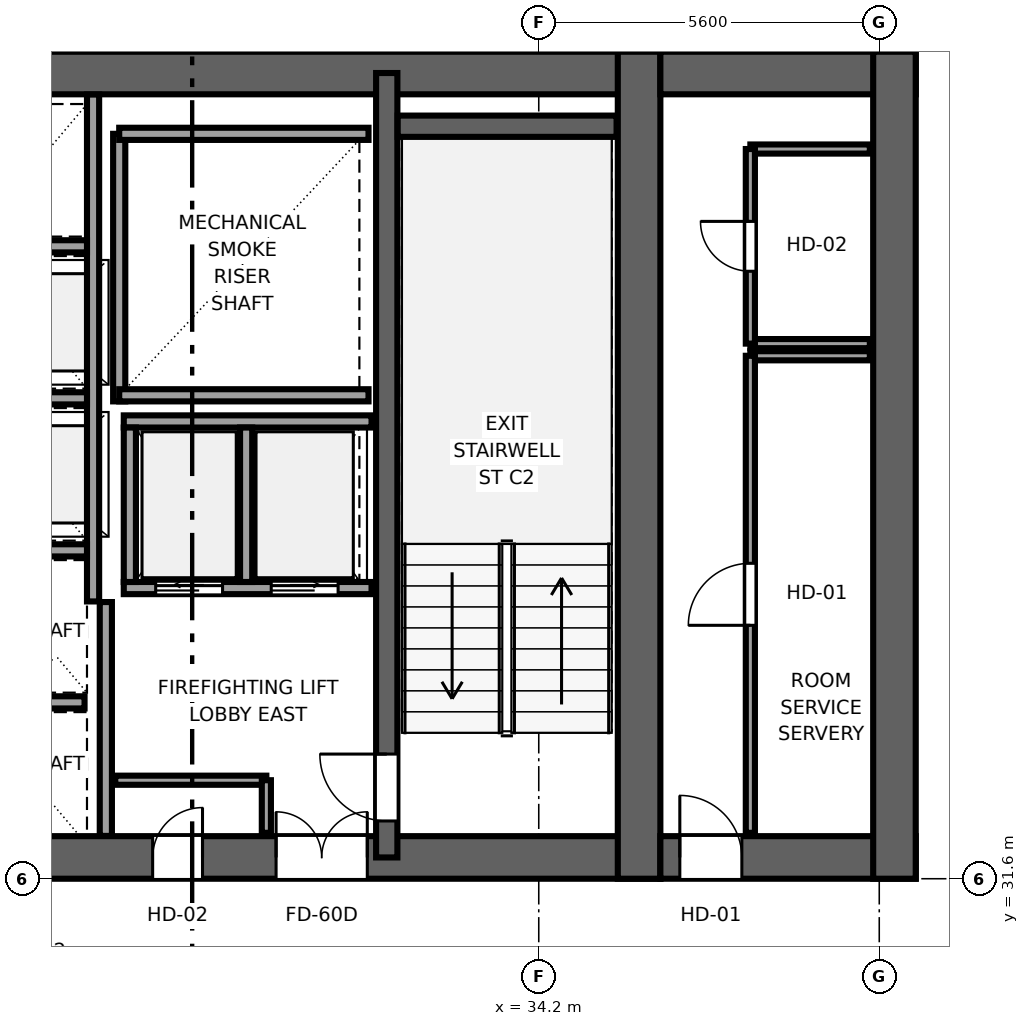
"""IFC4 building model, lengths in metres.
Left out: names, types, materials, properties, quantities, classifications, styles, units other than length and angle.
Written with IfcOpenShell. Run it as: python <this file> out.ifc"""

import sys

from ifc_helpers import new_model, si_unit, direction, frame, frame_2d, origin, place, context, subcontext, project, spatial, rectangle, extrude, source, transform, mapped, element, fill, save


model = new_model("IFC4")
c1 = context("Model", 3, precision=1e-05, world=origin(), true_north=direction((0.0, 1.0)))
c2 = subcontext(c1, "Body", "Model", "MODEL_VIEW")
j1 = project(units=[si_unit("LENGTHUNIT", "METRE"), si_unit("PLANEANGLEUNIT", "RADIAN")], contexts=[c1])
p1 = place(None, origin())
s1 = spatial("IfcSite", under=j1, at=p1, CompositionType="ELEMENT")
p2 = place(p1, origin())
s2 = spatial("IfcBuilding", under=s1, at=p2, CompositionType="ELEMENT")
p3 = place(p2, frame((0.0, 0.0, 115.1)))
s3 = spatial("IfcBuildingStorey", under=s2, at=p3, CompositionType="ELEMENT", Elevation=115.1)
p4 = place(p3, frame((9.8, 31.95, 0.0), z_axis=(0.0, 0.0, 1.0), x_axis=(1.0, 0.0, 0.0)))
e1 = element("IfcWall", 1, at=p4, inside=s3, PredefinedType="SHEAR", context=c2, shape_type="SweptSolid", body=[
    extrude(rectangle(XDim=26.4, YDim=0.7, at=frame_2d((13.2, 0.0))), origin(), (0.0, 0.0, 1.0), 3.55),
])
p5 = place(p4, frame((6.32, 0.0, 0.0), z_axis=(0.0, 0.0, 1.0), x_axis=(-1.0, 0.0, 0.0)))
e2 = element("IfcOpeningElement", 2, at=p5, cuts=e1, PredefinedType="OPENING", context=c2, shape_type="SweptSolid", body=[
    extrude(rectangle(XDim=1.5, YDim=2.04, at=frame_2d((0.75, 1.02))), frame((0.0, 0.36, 0.0), z_axis=(0.0, -1.0, 0.0), x_axis=(1.0, 0.0, 0.0)), (0.0, 0.0, 1.0), 0.72),
])
p6 = place(p4, frame((13.95, 0.0, 0.0), z_axis=(0.0, 0.0, 1.0), x_axis=(-1.0, 0.0, 0.0)))
e3 = element("IfcOpeningElement", 3, at=p6, cuts=e1, PredefinedType="OPENING", context=c2, shape_type="SweptSolid", body=[
    extrude(rectangle(XDim=1.5, YDim=2.04, at=frame_2d((0.75, 1.02))), frame((0.0, 0.36, 0.0), z_axis=(0.0, -1.0, 0.0), x_axis=(1.0, 0.0, 0.0)), (0.0, 0.0, 1.0), 0.72),
])
p7 = place(p4, frame((21.58, 0.0, 0.0), z_axis=(0.0, 0.0, 1.0), x_axis=(-1.0, 0.0, 0.0)))
e4 = element("IfcOpeningElement", 4, at=p7, cuts=e1, PredefinedType="OPENING", context=c2, shape_type="SweptSolid", body=[
    extrude(rectangle(XDim=1.5, YDim=2.04, at=frame_2d((0.75, 1.02))), frame((0.0, 0.36, 0.0), z_axis=(0.0, -1.0, 0.0), x_axis=(1.0, 0.0, 0.0)), (0.0, 0.0, 1.0), 0.72),
])
p8 = place(p4, frame((8.37, 0.0, 0.0), z_axis=(0.0, 0.0, 1.0), x_axis=(-1.0, 0.0, 0.0)))
e5 = element("IfcOpeningElement", 5, at=p8, cuts=e1, PredefinedType="OPENING", context=c2, shape_type="SweptSolid", body=[
    extrude(rectangle(XDim=0.82, YDim=2.01, at=frame_2d((0.41, 1.005))), frame((0.0, 0.36, 0.0), z_axis=(0.0, -1.0, 0.0), x_axis=(1.0, 0.0, 0.0)), (0.0, 0.0, 1.0), 0.72),
])
p9 = place(p4, frame((18.87, 0.0, 0.0), z_axis=(0.0, 0.0, 1.0), x_axis=(-1.0, 0.0, 0.0)))
e6 = element("IfcOpeningElement", 6, at=p9, cuts=e1, PredefinedType="OPENING", context=c2, shape_type="SweptSolid", body=[
    extrude(rectangle(XDim=0.82, YDim=2.01, at=frame_2d((0.41, 1.005))), frame((0.0, 0.36, 0.0), z_axis=(0.0, -1.0, 0.0), x_axis=(1.0, 0.0, 0.0)), (0.0, 0.0, 1.0), 0.72),
])
p10 = place(p3, frame((9.8, 44.85, 0.0), z_axis=(0.0, 0.0, 1.0), x_axis=(1.0, 0.0, 0.0)))
e7 = element("IfcWall", 7, at=p10, inside=s3, PredefinedType="SHEAR", context=c2, shape_type="SweptSolid", body=[
    extrude(rectangle(XDim=26.4, YDim=0.7, at=frame_2d((13.2, 0.0))), origin(), (0.0, 0.0, 1.0), 3.55),
])
p11 = place(p3, frame((35.85, 31.6, 0.0), z_axis=(0.0, 0.0, 1.0), x_axis=(0.0, 1.0, 0.0)))
e8 = element("IfcWall", 8, at=p11, inside=s3, PredefinedType="SHEAR", context=c2, shape_type="SweptSolid", body=[
    extrude(rectangle(XDim=13.6, YDim=0.7, at=frame_2d((6.8, 0.0))), origin(), (0.0, 0.0, 1.0), 3.55),
])
p12 = place(p3, frame((31.7, 31.95, 0.0), z_axis=(0.0, 0.0, 1.0), x_axis=(0.0, 1.0, 0.0)))
e9 = element("IfcWall", 9, at=p12, inside=s3, PredefinedType="SHEAR", context=c2, shape_type="SweptSolid", body=[
    extrude(rectangle(XDim=12.9, YDim=0.35, at=frame_2d((6.45, 0.0))), origin(), (0.0, 0.0, 1.0), 3.55),
])
p13 = place(p12, frame((1.7, 0.0, 0.0), z_axis=(0.0, 0.0, 1.0), x_axis=(-1.0, 0.0, 0.0)))
e10 = element("IfcOpeningElement", 10, at=p13, cuts=e9, PredefinedType="OPENING", context=c2, shape_type="SweptSolid", body=[
    extrude(rectangle(XDim=1.1, YDim=2.12, at=frame_2d((0.55, 1.06))), frame((0.0, 0.185, 0.0), z_axis=(0.0, -1.0, 0.0), x_axis=(1.0, 0.0, 0.0)), (0.0, 0.0, 1.0), 0.37),
])
p14 = place(p3, frame((36.2, 31.95, 0.0), z_axis=(0.0, 0.0, 1.0), x_axis=(1.0, 0.0, 0.0)))
e11 = element("IfcWall", 11, at=p14, inside=s3, PredefinedType="SHEAR", context=c2, shape_type="SweptSolid", body=[
    extrude(rectangle(XDim=4.2, YDim=0.7, at=frame_2d((2.1, 0.0))), origin(), (0.0, 0.0, 1.0), 3.55),
])
p15 = place(p14, frame((1.34, 0.0, 0.0), z_axis=(0.0, 0.0, 1.0), x_axis=(-1.0, 0.0, 0.0)))
e12 = element("IfcOpeningElement", 12, at=p15, cuts=e11, PredefinedType="OPENING", context=c2, shape_type="SweptSolid", body=[
    extrude(rectangle(XDim=1.02, YDim=2.03, at=frame_2d((0.51, 1.015))), frame((0.0, 0.36, 0.0), z_axis=(0.0, -1.0, 0.0), x_axis=(1.0, 0.0, 0.0)), (0.0, 0.0, 1.0), 0.72),
])
p16 = place(p3, frame((36.2, 44.85, 0.0), z_axis=(0.0, 0.0, 1.0), x_axis=(1.0, 0.0, 0.0)))
e13 = element("IfcWall", 13, at=p16, inside=s3, PredefinedType="SHEAR", context=c2, shape_type="SweptSolid", body=[
    extrude(rectangle(XDim=4.2, YDim=0.7, at=frame_2d((2.1, 0.0))), origin(), (0.0, 0.0, 1.0), 3.55),
])
p17 = place(p3, frame((40.05, 31.6, 0.0), z_axis=(0.0, 0.0, 1.0), x_axis=(0.0, 1.0, 0.0)))
e14 = element("IfcWall", 14, at=p17, inside=s3, PredefinedType="SHEAR", context=c2, shape_type="SweptSolid", body=[
    extrude(rectangle(XDim=13.6, YDim=0.7, at=frame_2d((6.8, 0.0))), origin(), (0.0, 0.0, 1.0), 3.55),
])
p18 = place(p3, frame((31.88, 43.975, 0.0), z_axis=(0.0, 0.0, 1.0), x_axis=(1.0, 0.0, 0.0)))
e15 = element("IfcWall", 15, at=p18, inside=s3, PredefinedType="SHEAR", context=c2, shape_type="SweptSolid", body=[
    extrude(rectangle(XDim=3.6, YDim=0.35, at=frame_2d((1.8, 0.0))), origin(), (0.0, 0.0, 1.0), 3.55),
])
p19 = place(p3, frame((27.3, 39.45, 0.0), z_axis=(0.0, 0.0, 1.0), x_axis=(0.0, 1.0, 0.0)))
e16 = element("IfcWall", 16, at=p19, inside=s3, PredefinedType="SOLIDWALL", context=c2, shape_type="SweptSolid", body=[
    extrude(rectangle(XDim=4.4, YDim=0.2, at=frame_2d((2.2, 0.0))), origin(), (0.0, 0.0, 1.0), 3.37),
])
for number, where, z_axis, x_axis in (
    (17, (27.3, 39.55, 0.0), (0.0, 0.0, 1.0), (1.0, 0.0, 0.0)),
    (18, (27.3, 43.85, 0.0), (0.0, 0.0, 1.0), (1.0, 0.0, 0.0)),
):
    element("IfcWall", number, at=place(p3, frame(where, z_axis=z_axis, x_axis=x_axis)), inside=s3, PredefinedType="SOLIDWALL", context=c2, shape_type="SweptSolid", body=[
        extrude(rectangle(XDim=4.1, YDim=0.2, at=frame_2d((2.05, 0.0))), origin(), (0.0, 0.0, 1.0), 3.37),
    ])
p20 = place(p3, frame((27.08, 32.304, 0.0), z_axis=(0.0, 0.0, 1.0), x_axis=(0.0, 1.0, 0.0)))
e19 = element("IfcWall", 19, at=p20, inside=s3, PredefinedType="SOLIDWALL", context=c2, shape_type="SweptSolid", body=[
    extrude(rectangle(XDim=3.846, YDim=0.2, at=frame_2d((1.923, 0.0))), origin(), (0.0, 0.0, 1.0), 3.37),
])
p21 = place(p3, frame((27.375, 36.38, 0.0), z_axis=(0.0, 0.0, 1.0), x_axis=(1.0, 0.0, 0.0)))
e20 = element("IfcWall", 20, at=p21, inside=s3, PredefinedType="SOLIDWALL", context=c2, shape_type="SweptSolid", body=[
    extrude(rectangle(XDim=4.075, YDim=0.2, at=frame_2d((2.038, 0.0))), origin(), (0.0, 0.0, 1.0), 3.37),
])
p22 = place(p21, frame((0.525, 0.0, 0.0)))
e21 = element("IfcOpeningElement", 21, at=p22, cuts=e20, PredefinedType="OPENING", context=c2, shape_type="SweptSolid", body=[
    extrude(rectangle(XDim=1.1, YDim=2.12, at=frame_2d((0.55, 1.06))), frame((0.0, 0.11, 0.0), z_axis=(0.0, -1.0, 0.0), x_axis=(1.0, 0.0, 0.0)), (0.0, 0.0, 1.0), 0.22),
])
p23 = place(p21, frame((2.425, 0.0, 0.0)))
e22 = element("IfcOpeningElement", 22, at=p23, cuts=e20, PredefinedType="OPENING", context=c2, shape_type="SweptSolid", body=[
    extrude(rectangle(XDim=1.1, YDim=2.12, at=frame_2d((0.55, 1.06))), frame((0.0, 0.11, 0.0), z_axis=(0.0, -1.0, 0.0), x_axis=(1.0, 0.0, 0.0)), (0.0, 0.0, 1.0), 0.22),
])
p24 = place(p3, frame((27.375, 39.12, 0.0), z_axis=(0.0, 0.0, 1.0), x_axis=(1.0, 0.0, 0.0)))
e23 = element("IfcWall", 23, at=p24, inside=s3, PredefinedType="SOLIDWALL", context=c2, shape_type="SweptSolid", body=[
    extrude(rectangle(XDim=4.075, YDim=0.2, at=frame_2d((2.038, 0.0))), origin(), (0.0, 0.0, 1.0), 3.37),
])
for number, where, z_axis, x_axis in (
    (24, (27.475, 36.48, 0.0), (0.0, 0.0, 1.0), (0.0, 1.0, 0.0)),
    (25, (29.387, 36.48, 0.0), (0.0, 0.0, 1.0), (0.0, 1.0, 0.0)),
):
    element("IfcWall", number, at=place(p3, frame(where, z_axis=z_axis, x_axis=x_axis)), inside=s3, PredefinedType="SOLIDWALL", context=c2, shape_type="SweptSolid", body=[
        extrude(rectangle(XDim=2.54, YDim=0.2, at=frame_2d((1.27, 0.0))), origin(), (0.0, 0.0, 1.0), 3.37),
    ])
p25 = place(p3, frame((26.87, 36.16, 0.0), z_axis=(0.0, 0.0, 1.0), x_axis=(0.0, 1.0, 0.0)))
e26 = element("IfcWall", 26, at=p25, inside=s3, PredefinedType="SOLIDWALL", context=c2, shape_type="SweptSolid", body=[
    extrude(rectangle(XDim=8.336, YDim=0.2, at=frame_2d((4.168, 0.0))), origin(), (0.0, 0.0, 1.0), 3.37),
])
p26 = place(p3, frame((24.93, 34.5, 0.0), z_axis=(0.0, 0.0, 1.0), x_axis=(1.0, 0.0, 0.0)))
e27 = element("IfcWall", 27, at=p26, inside=s3, PredefinedType="SOLIDWALL", context=c2, shape_type="SweptSolid", body=[
    extrude(rectangle(XDim=1.8, YDim=0.2, at=frame_2d((0.9, 0.0))), origin(), (0.0, 0.0, 1.0), 3.37),
])
for number, where, z_axis, x_axis in (
    (28, (24.93, 37.0, 0.0), (0.0, 0.0, 1.0), (1.0, 0.0, 0.0)),
    (29, (24.93, 39.5, 0.0), (0.0, 0.0, 1.0), (1.0, 0.0, 0.0)),
    (30, (24.93, 42.0, 0.0), (0.0, 0.0, 1.0), (1.0, 0.0, 0.0)),
):
    element("IfcWall", number, at=place(p3, frame(where, z_axis=z_axis, x_axis=x_axis)), inside=s3, PredefinedType="SOLIDWALL", context=c2, shape_type="SweptSolid", body=[
        extrude(rectangle(XDim=1.84, YDim=0.2, at=frame_2d((0.92, 0.0))), origin(), (0.0, 0.0, 1.0), 3.37),
    ])
p27 = place(p3, frame((27.235, 33.22, 0.0), z_axis=(0.0, 0.0, 1.0), x_axis=(1.0, 0.0, 0.0)))
e31 = element("IfcWall", 31, at=p27, inside=s3, PredefinedType="PARTITIONING", context=c2, shape_type="SweptSolid", body=[
    extrude(rectangle(XDim=2.485, YDim=0.15, at=frame_2d((1.242, 0.0))), origin(), (0.0, 0.0, 1.0), 3.37),
])
p28 = place(p3, frame((29.72, 32.355, 0.0), z_axis=(0.0, 0.0, 1.0), x_axis=(0.0, 1.0, 0.0)))
e32 = element("IfcWall", 32, at=p28, inside=s3, PredefinedType="PARTITIONING", context=c2, shape_type="SweptSolid", body=[
    extrude(rectangle(XDim=0.865, YDim=0.15, at=frame_2d((0.433, 0.0))), origin(), (0.0, 0.0, 1.0), 3.37),
])
p29 = place(p3, frame((37.68, 40.2, 0.0), z_axis=(0.0, 0.0, 1.0), x_axis=(1.0, 0.0, 0.0)))
e33 = element("IfcWall", 33, at=p29, inside=s3, PredefinedType="PARTITIONING", context=c2, shape_type="SweptSolid", body=[
    extrude(rectangle(XDim=1.965, YDim=0.15, at=frame_2d((0.982, 0.0))), origin(), (0.0, 0.0, 1.0), 3.37),
])
p30 = place(p3, frame((37.68, 32.355, 0.0), z_axis=(0.0, 0.0, 1.0), x_axis=(0.0, 1.0, 0.0)))
e34 = element("IfcWall", 34, at=p30, inside=s3, PredefinedType="PARTITIONING", context=c2, shape_type="SweptSolid", body=[
    extrude(rectangle(XDim=7.845, YDim=0.15, at=frame_2d((3.922, 0.0))), origin(), (0.0, 0.0, 1.0), 3.37),
])
p31 = place(p30, frame((3.413, 0.0, 0.0)))
e35 = element("IfcOpeningElement", 35, at=p31, cuts=e34, PredefinedType="OPENING", context=c2, shape_type="SweptSolid", body=[
    extrude(rectangle(XDim=1.02, YDim=2.03, at=frame_2d((0.51, 1.015))), frame((0.0, 0.085, 0.0), z_axis=(0.0, -1.0, 0.0), x_axis=(1.0, 0.0, 0.0)), (0.0, 0.0, 1.0), 0.17),
])
for number, where, z_axis, x_axis in (
    (36, (37.68, 40.4, 0.0), (0.0, 0.0, 1.0), (1.0, 0.0, 0.0)),
    (37, (37.68, 43.6, 0.0), (0.0, 0.0, 1.0), (1.0, 0.0, 0.0)),
):
    element("IfcWall", number, at=place(p3, frame(where, z_axis=z_axis, x_axis=x_axis)), inside=s3, PredefinedType="PARTITIONING", context=c2, shape_type="SweptSolid", body=[
        extrude(rectangle(XDim=1.965, YDim=0.15, at=frame_2d((0.982, 0.0))), origin(), (0.0, 0.0, 1.0), 3.37),
    ])
p32 = place(p3, frame((37.68, 40.4, 0.0), z_axis=(0.0, 0.0, 1.0), x_axis=(0.0, 1.0, 0.0)))
e38 = element("IfcWall", 38, at=p32, inside=s3, PredefinedType="PARTITIONING", context=c2, shape_type="SweptSolid", body=[
    extrude(rectangle(XDim=3.2, YDim=0.15, at=frame_2d((1.6, 0.0))), origin(), (0.0, 0.0, 1.0), 3.37),
])
p33 = place(p32, frame((1.19, 0.0, 0.0)))
e39 = element("IfcOpeningElement", 39, at=p33, cuts=e38, PredefinedType="OPENING", context=c2, shape_type="SweptSolid", body=[
    extrude(rectangle(XDim=0.82, YDim=2.01, at=frame_2d((0.41, 1.005))), frame((0.0, 0.085, 0.0), z_axis=(0.0, -1.0, 0.0), x_axis=(1.0, 0.0, 0.0)), (0.0, 0.0, 1.0), 0.17),
])
m1 = source(origin(), c2, "Body", "SweptSolid", [
    extrude(rectangle(XDim=1.1, YDim=2.12, at=frame_2d((0.55, 1.06))), frame((0.0, 0.025, 0.0), z_axis=(0.0, -1.0, 0.0), x_axis=(1.0, 0.0, 0.0)), (0.0, 0.0, 1.0), 0.05),
])
p34 = place(p13, origin())
e40 = element("IfcDoor", 40, at=p34, inside=s3, OperationType="SINGLE_SWING_RIGHT", PredefinedType="DOOR", context=c2, shape_type="MappedRepresentation", body=[
    mapped(m1, transform((0.0, 0.0, 0.0), x_axis=(1.0, 0.0, 0.0), y_axis=(0.0, 1.0, 0.0), z_axis=(0.0, 0.0, 1.0), scale=1.0)),
])
fill(e10, e40)
m2 = source(origin(), c2, "Body", "SweptSolid", [
    extrude(rectangle(XDim=1.5, YDim=2.04, at=frame_2d((0.75, 1.02))), frame((0.0, 0.025, 0.0), z_axis=(0.0, -1.0, 0.0), x_axis=(1.0, 0.0, 0.0)), (0.0, 0.0, 1.0), 0.05),
])
p35 = place(p7, origin())
e41 = element("IfcDoor", 41, at=p35, inside=s3, OperationType="DOUBLE_DOOR_SINGLE_SWING", PredefinedType="DOOR", context=c2, shape_type="MappedRepresentation", body=[
    mapped(m2, transform((0.0, 0.0, 0.0), x_axis=(1.0, 0.0, 0.0), y_axis=(0.0, 1.0, 0.0), z_axis=(0.0, 0.0, 1.0), scale=1.0)),
])
fill(e4, e41)
m3 = source(origin(), c2, "Body", "SweptSolid", [
    extrude(rectangle(XDim=0.82, YDim=2.01, at=frame_2d((0.41, 1.005))), frame((0.0, 0.025, 0.0), z_axis=(0.0, -1.0, 0.0), x_axis=(1.0, 0.0, 0.0)), (0.0, 0.0, 1.0), 0.05),
])
p36 = place(p9, origin())
e42 = element("IfcDoor", 42, at=p36, inside=s3, OperationType="SINGLE_SWING_RIGHT", PredefinedType="DOOR", context=c2, shape_type="MappedRepresentation", body=[
    mapped(m3, transform((0.0, 0.0, 0.0), x_axis=(1.0, 0.0, 0.0), y_axis=(0.0, 1.0, 0.0), z_axis=(0.0, 0.0, 1.0), scale=1.0)),
])
fill(e6, e42)
m4 = source(origin(), c2, "Body", "SweptSolid", [
    extrude(rectangle(XDim=1.02, YDim=2.03, at=frame_2d((0.51, 1.015))), frame((0.0, 0.025, 0.0), z_axis=(0.0, -1.0, 0.0), x_axis=(1.0, 0.0, 0.0)), (0.0, 0.0, 1.0), 0.05),
])
p37 = place(p15, origin())
e43 = element("IfcDoor", 43, at=p37, inside=s3, OperationType="SINGLE_SWING_LEFT", PredefinedType="DOOR", context=c2, shape_type="MappedRepresentation", body=[
    mapped(m4, transform((0.0, 0.0, 0.0), x_axis=(1.0, 0.0, 0.0), y_axis=(0.0, 1.0, 0.0), z_axis=(0.0, 0.0, 1.0), scale=1.0)),
])
fill(e12, e43)
m5 = source(origin(), c2, "Body", "SweptSolid", [
    extrude(rectangle(XDim=1.1, YDim=2.12, at=frame_2d((0.55, 1.06))), frame((0.0, 0.025, 0.0), z_axis=(0.0, -1.0, 0.0), x_axis=(1.0, 0.0, 0.0)), (0.0, 0.0, 1.0), 0.05),
])
p38 = place(p22, origin())
e44 = element("IfcDoor", 44, at=p38, inside=s3, OperationType="SLIDING_TO_LEFT", PredefinedType="DOOR", context=c2, shape_type="MappedRepresentation", body=[
    mapped(m5, transform((0.0, 0.0, 0.0), x_axis=(1.0, 0.0, 0.0), y_axis=(0.0, 1.0, 0.0), z_axis=(0.0, 0.0, 1.0), scale=1.0)),
])
fill(e21, e44)
p39 = place(p23, origin())
e45 = element("IfcDoor", 45, at=p39, inside=s3, OperationType="SLIDING_TO_RIGHT", PredefinedType="DOOR", context=c2, shape_type="MappedRepresentation", body=[
    mapped(m5, transform((0.0, 0.0, 0.0), x_axis=(1.0, 0.0, 0.0), y_axis=(0.0, 1.0, 0.0), z_axis=(0.0, 0.0, 1.0), scale=1.0)),
])
fill(e22, e45)
p40 = place(p31, origin())
e46 = element("IfcDoor", 46, at=p40, inside=s3, OperationType="SINGLE_SWING_LEFT", PredefinedType="DOOR", context=c2, shape_type="MappedRepresentation", body=[
    mapped(m4, transform((0.0, 0.0, 0.0), x_axis=(1.0, 0.0, 0.0), y_axis=(0.0, 1.0, 0.0), z_axis=(0.0, 0.0, 1.0), scale=1.0)),
])
fill(e35, e46)
p41 = place(p33, origin())
e47 = element("IfcDoor", 47, at=p41, inside=s3, OperationType="SINGLE_SWING_RIGHT", PredefinedType="DOOR", context=c2, shape_type="MappedRepresentation", body=[
    mapped(m3, transform((0.0, 0.0, 0.0), x_axis=(1.0, 0.0, 0.0), y_axis=(0.0, 1.0, 0.0), z_axis=(0.0, 0.0, 1.0), scale=1.0)),
])
fill(e39, e47)
save(model, sys.argv[1])
